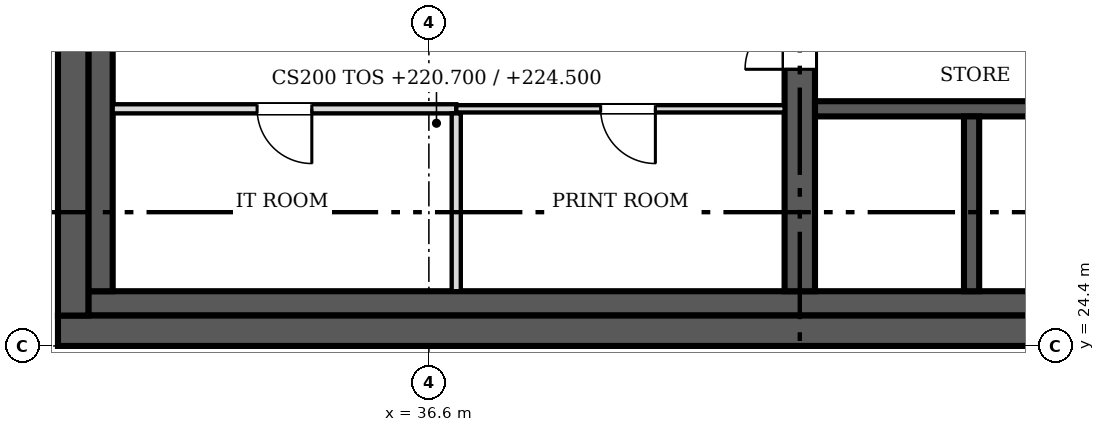
"""IFC4 building model, lengths in metres.
Left out: names, types, materials, properties, quantities, classifications, styles, units other than length and angle.
Written with IfcOpenShell. Run it as: python <this file> out.ifc"""

import sys

from ifc_helpers import new_model, si_unit, direction, frame, frame_2d, origin, place, context, subcontext, project, spatial, rectangle, extrude, source, transform, mapped, element, fill, save


model = new_model("IFC4")
c1 = context("Model", 3, precision=1e-05, world=origin(), true_north=direction((0.0, 1.0)))
c2 = subcontext(c1, "Body", "Model", "MODEL_VIEW")
j1 = project(units=[si_unit("LENGTHUNIT", "METRE"), si_unit("PLANEANGLEUNIT", "RADIAN")], contexts=[c1])
p1 = place(None, origin())
s1 = spatial("IfcSite", under=j1, at=p1, CompositionType="ELEMENT")
p2 = place(p1, origin())
s2 = spatial("IfcBuilding", under=s1, at=p2, CompositionType="ELEMENT")
p3 = place(p2, frame((0.0, 0.0, 220.7)))
s3 = spatial("IfcBuildingStorey", under=s2, at=p3, CompositionType="ELEMENT", Elevation=220.7)
p4 = place(p3, frame((54.9, 24.65, 0.0), z_axis=(0.0, 0.0, 1.0), x_axis=(-1.0, 0.0, 0.0)))
e1 = element("IfcWall", 1, at=p4, inside=s3, PredefinedType="SHEAR", context=c2, shape_type="SweptSolid", body=[
    extrude(rectangle(XDim=24.4, YDim=0.5, at=frame_2d((12.2, 0.0))), origin(), (0.0, 0.0, 1.0), 3.8),
])
m1 = source(origin(), c2, "Body", "SweptSolid", [
    extrude(rectangle(XDim=1.2, YDim=2.1, at=frame_2d((0.6, 1.05))), frame((0.0, 0.26, 0.0), z_axis=(0.0, -1.0, 0.0), x_axis=(1.0, 0.0, 0.0)), (0.0, 0.0, 1.0), 0.52),
])
p5 = place(p4, frame((1.5, 0.0, 0.0)))
e2 = element("IfcOpeningElement", 2, at=p5, cuts=e1, PredefinedType="OPENING", context=c2, shape_type="MappedRepresentation", body=[
    mapped(m1, transform((0.0, 0.0, 0.0), scale=1.0)),
])
p6 = place(p3, frame((30.75, 24.9, 0.0), z_axis=(0.0, 0.0, 1.0), x_axis=(0.0, 1.0, 0.0)))
e3 = element("IfcWall", 3, at=p6, inside=s3, PredefinedType="SHEAR", context=c2, shape_type="SweptSolid", body=[
    extrude(rectangle(XDim=23.4, YDim=0.5, at=frame_2d((11.7, 0.0))), origin(), (0.0, 0.0, 1.0), 3.8),
])
m2 = source(origin(), c2, "Body", "SweptSolid", [
    extrude(rectangle(XDim=2.1, YDim=2.4, at=frame_2d((1.05, 1.2))), frame((0.0, 0.26, 0.0), z_axis=(0.0, -1.0, 0.0), x_axis=(1.0, 0.0, 0.0)), (0.0, 0.0, 1.0), 0.52),
])
p7 = place(p6, frame((4.9, 0.0, 0.0)))
e4 = element("IfcOpeningElement", 4, at=p7, cuts=e3, PredefinedType="OPENING", context=c2, shape_type="MappedRepresentation", body=[
    mapped(m2, transform((0.0, 0.0, 0.0), scale=1.0)),
])
p8 = place(p6, frame((16.4, 0.0, 0.0)))
e5 = element("IfcOpeningElement", 5, at=p8, cuts=e3, PredefinedType="OPENING", context=c2, shape_type="MappedRepresentation", body=[
    mapped(m2, transform((0.0, 0.0, 0.0), scale=1.0)),
])
p9 = place(p3, frame((31.0, 25.1, 0.0), z_axis=(0.0, 0.0, 1.0), x_axis=(1.0, 0.0, 0.0)))
e6 = element("IfcWall", 6, at=p9, inside=s3, PredefinedType="SOLIDWALL", context=c2, shape_type="SweptSolid", body=[
    extrude(rectangle(XDim=21.2, YDim=0.4, at=frame_2d((10.6, 0.0))), origin(), (0.0, 0.0, 1.0), 3.8),
])
p10 = place(p3, frame((31.2, 25.3, 0.0), z_axis=(0.0, 0.0, 1.0), x_axis=(0.0, 1.0, 0.0)))
e7 = element("IfcWall", 7, at=p10, inside=s3, PredefinedType="SOLIDWALL", context=c2, shape_type="SweptSolid", body=[
    extrude(rectangle(XDim=4.5, YDim=0.4, at=frame_2d((2.25, 0.0))), origin(), (0.0, 0.0, 1.0), 3.8),
])
p11 = place(p3, frame((42.7, 36.35, 0.0), z_axis=(0.0, 0.0, 1.0), x_axis=(0.0, -1.0, 0.0)))
e8 = element("IfcWall", 8, at=p11, inside=s3, PredefinedType="SHEAR", context=c2, shape_type="SweptSolid", body=[
    extrude(rectangle(XDim=11.05, YDim=0.5, at=frame_2d((5.525, 0.0))), origin(), (0.0, 0.0, 1.0), 3.8),
])
m3 = source(origin(), c2, "Body", "SweptSolid", [
    extrude(rectangle(XDim=0.9, YDim=2.1, at=frame_2d((0.45, 1.05))), frame((0.0, 0.26, 0.0), z_axis=(0.0, -1.0, 0.0), x_axis=(1.0, 0.0, 0.0)), (0.0, 0.0, 1.0), 0.52),
])
p12 = place(p11, frame((6.5, 0.0, 0.0)))
e9 = element("IfcOpeningElement", 9, at=p12, cuts=e8, PredefinedType="OPENING", context=c2, shape_type="MappedRepresentation", body=[
    mapped(m3, transform((0.0, 0.0, 0.0), scale=1.0)),
])
m4 = source(origin(), c2, "Body", "SweptSolid", [
    extrude(rectangle(XDim=1.1, YDim=2.1, at=frame_2d((0.55, 1.05))), frame((0.0, 0.26, 0.0), z_axis=(0.0, -1.0, 0.0), x_axis=(1.0, 0.0, 0.0)), (0.0, 0.0, 1.0), 0.52),
])
p13 = place(p11, frame((3.8, 0.0, 0.0)))
e10 = element("IfcOpeningElement", 10, at=p13, cuts=e8, PredefinedType="OPENING", context=c2, shape_type="MappedRepresentation", body=[
    mapped(m4, transform((0.0, 0.0, 0.0), scale=1.0)),
])
p14 = place(p3, frame((42.95, 28.3, 0.0), z_axis=(0.0, 0.0, 1.0), x_axis=(1.0, 0.0, 0.0)))
e11 = element("IfcWall", 11, at=p14, inside=s3, PredefinedType="SOLIDWALL", context=c2, shape_type="SweptSolid", body=[
    extrude(rectangle(XDim=5.275, YDim=0.25, at=frame_2d((2.638, 0.0))), origin(), (0.0, 0.0, 1.0), 3.8),
])
p15 = place(p3, frame((45.525, 25.3, 0.0), z_axis=(0.0, 0.0, 1.0), x_axis=(0.0, 1.0, 0.0)))
e12 = element("IfcWall", 12, at=p15, inside=s3, PredefinedType="SOLIDWALL", context=c2, shape_type="SweptSolid", body=[
    extrude(rectangle(XDim=2.875, YDim=0.25, at=frame_2d((1.438, 0.0))), origin(), (0.0, 0.0, 1.0), 3.8),
])
p16 = place(p3, frame((37.05, 28.3, 0.0), z_axis=(0.0, 0.0, 1.0), x_axis=(-1.0, 0.0, 0.0)))
e13 = element("IfcWall", 13, at=p16, inside=s3, PredefinedType="PARTITIONING", context=c2, shape_type="SweptSolid", body=[
    extrude(rectangle(XDim=5.65, YDim=0.15, at=frame_2d((2.825, 0.0))), origin(), (0.0, 0.0, 1.0), 3.6),
])
m5 = source(origin(), c2, "Body", "SweptSolid", [
    extrude(rectangle(XDim=0.9, YDim=2.1, at=frame_2d((0.45, 1.05))), frame((0.0, 0.085, 0.0), z_axis=(0.0, -1.0, 0.0), x_axis=(1.0, 0.0, 0.0)), (0.0, 0.0, 1.0), 0.17),
])
p17 = place(p16, frame((2.375, 0.0, 0.0)))
e14 = element("IfcOpeningElement", 14, at=p17, cuts=e13, PredefinedType="OPENING", context=c2, shape_type="MappedRepresentation", body=[
    mapped(m5, transform((0.0, 0.0, 0.0), scale=1.0)),
])
p18 = place(p3, frame((42.45, 28.3, 0.0), z_axis=(0.0, 0.0, 1.0), x_axis=(-1.0, 0.0, 0.0)))
e15 = element("IfcWall", 15, at=p18, inside=s3, PredefinedType="PARTITIONING", context=c2, shape_type="SweptSolid", body=[
    extrude(rectangle(XDim=5.4, YDim=0.12, at=frame_2d((2.7, 0.0))), origin(), (0.0, 0.0, 1.0), 3.6),
])
m6 = source(origin(), c2, "Body", "SweptSolid", [
    extrude(rectangle(XDim=0.9, YDim=2.1, at=frame_2d((0.45, 1.05))), frame((0.0, 0.07, 0.0), z_axis=(0.0, -1.0, 0.0), x_axis=(1.0, 0.0, 0.0)), (0.0, 0.0, 1.0), 0.14),
])
p19 = place(p18, frame((2.125, 0.0, 0.0)))
e16 = element("IfcOpeningElement", 16, at=p19, cuts=e15, PredefinedType="OPENING", context=c2, shape_type="MappedRepresentation", body=[
    mapped(m6, transform((0.0, 0.0, 0.0), scale=1.0)),
])
p20 = place(p3, frame((37.05, 25.3, 0.0), z_axis=(0.0, 0.0, 1.0), x_axis=(0.0, 1.0, 0.0)))
e17 = element("IfcWall", 17, at=p20, inside=s3, PredefinedType="PARTITIONING", context=c2, shape_type="SweptSolid", body=[
    extrude(rectangle(XDim=2.925, YDim=0.15, at=frame_2d((1.462, 0.0))), origin(), (0.0, 0.0, 1.0), 3.6),
])
m7 = source(origin(), c2, "Body", "SweptSolid", [
    extrude(rectangle(XDim=0.9, YDim=2.1, at=frame_2d((0.45, 1.05))), frame((0.0, 0.025, 0.0), z_axis=(0.0, -1.0, 0.0), x_axis=(1.0, 0.0, 0.0)), (0.0, 0.0, 1.0), 0.05),
])
p21 = place(p12, origin())
e18 = element("IfcDoor", 18, at=p21, inside=s3, OperationType="SINGLE_SWING_RIGHT", PredefinedType="DOOR", context=c2, shape_type="MappedRepresentation", body=[
    mapped(m7, transform((0.0, 0.0, 0.0), scale=1.0)),
])
fill(e9, e18)
p22 = place(p17, origin())
e19 = element("IfcDoor", 19, at=p22, inside=s3, OperationType="SINGLE_SWING_LEFT", PredefinedType="DOOR", context=c2, shape_type="MappedRepresentation", body=[
    mapped(m7, transform((0.0, 0.0, 0.0), scale=1.0)),
])
fill(e14, e19)
p23 = place(p19, origin())
e20 = element("IfcDoor", 20, at=p23, inside=s3, OperationType="SINGLE_SWING_LEFT", PredefinedType="DOOR", context=c2, shape_type="MappedRepresentation", body=[
    mapped(m7, transform((0.0, 0.0, 0.0), scale=1.0)),
])
fill(e16, e20)
save(model, sys.argv[1])
